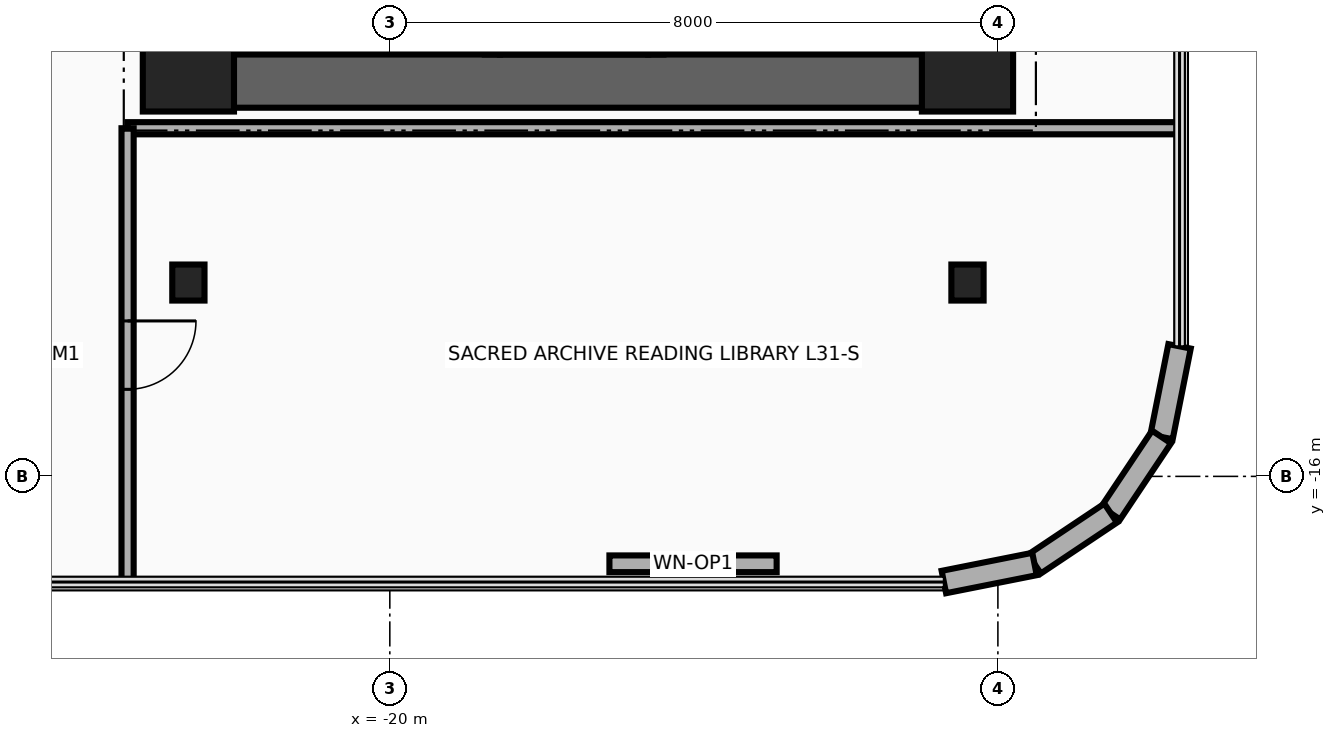
"""IFC4 building model, lengths in metres.
Left out: names, types, materials, properties, quantities, classifications, styles, units other than length and angle.
Written with IfcOpenShell. Run it as: python <this file> out.ifc"""

import sys

from ifc_helpers import new_model, si_unit, direction, frame, frame_2d, origin, origin_2d, place, context, subcontext, project, spatial, rectangle, i_section, extrude, source, transform, mapped, element, fill, save


model = new_model("IFC4")
c1 = context("Model", 3, precision=1e-05, world=origin(), true_north=direction((0.0, 1.0)))
c2 = subcontext(c1, "Body", "Model", "MODEL_VIEW")
j1 = project(units=[si_unit("LENGTHUNIT", "METRE"), si_unit("PLANEANGLEUNIT", "RADIAN")], contexts=[c1])
p1 = place(None, origin())
s1 = spatial("IfcSite", under=j1, at=p1, CompositionType="ELEMENT")
p2 = place(p1, origin())
s2 = spatial("IfcBuilding", under=s1, at=p2, CompositionType="ELEMENT")
p3 = place(p2, frame((0.0, 0.0, 124.2)))
s3 = spatial("IfcBuildingStorey", under=s2, at=p3, CompositionType="ELEMENT", Elevation=124.2)
for number, where, z_axis, x_axis in (
    (1, (-22.16, -10.45, 0.0), (0.0, 0.0, 1.0), (0.0, 1.0, 0.0)),
    (2, (-18.83, -10.45, 0.0), (0.0, 0.0, 1.0), (0.0, 1.0, 0.0)),
):
    element("IfcWall", number, at=place(p3, frame(where, z_axis=z_axis, x_axis=x_axis)), inside=s3, PredefinedType="SHEAR", context=c2, shape_type="SweptSolid", body=[
        extrude(rectangle(XDim=8.67, YDim=0.22, at=frame_2d((4.335, 0.0))), origin(), (0.0, 0.0, 1.0), 3.46),
    ])
p4 = place(p3, frame((-22.65, -11.15, 0.0), z_axis=(0.0, 0.0, 1.0), x_axis=(0.0, 1.0, 0.0)))
e3 = element("IfcWall", 3, at=p4, inside=s3, PredefinedType="SHEAR", context=c2, shape_type="SweptSolid", body=[
    extrude(rectangle(XDim=22.3, YDim=0.7, at=frame_2d((11.15, 0.0))), origin(), (0.0, 0.0, 1.0), 3.46),
])
p5 = place(p3, frame((-22.65, -10.8, 0.0), z_axis=(0.0, 0.0, 1.0), x_axis=(1.0, 0.0, 0.0)))
e4 = element("IfcWall", 4, at=p5, inside=s3, PredefinedType="SHEAR", context=c2, shape_type="SweptSolid", body=[
    extrude(rectangle(XDim=10.25, YDim=0.7, at=frame_2d((5.125, 0.0))), origin(), (0.0, 0.0, 1.0), 3.46),
])
m1 = source(origin(), c2, "Body", "SweptSolid", [
    extrude(rectangle(XDim=1.2, YDim=1.2, at=origin_2d()), origin(), (0.0, 0.0, 1.0), 3.7),
])
for number, where, z_axis, x_axis in (
    (5, (-22.65, -10.6, 0.0), (0.0, 0.0, 1.0), (1.0, 0.0, 0.0)),
    (6, (-12.4, -10.6, 0.0), (0.0, 0.0, 1.0), (1.0, 0.0, 0.0)),
):
    element("IfcColumn", number, at=place(p3, frame(where, z_axis=z_axis, x_axis=x_axis)), inside=s3, PredefinedType="COLUMN", context=c2, shape_type="MappedRepresentation", body=[
        mapped(m1, transform((0.0, 0.0, 0.0), x_axis=(1.0, 0.0, 0.0), y_axis=(0.0, 1.0, 0.0), z_axis=(0.0, 0.0, 1.0), scale=1.0)),
    ])
m2 = source(origin(), c2, "Body", "SweptSolid", [
    extrude(i_section(OverallWidth=0.424, OverallDepth=0.474, WebThickness=0.048, FlangeThickness=0.077, at=origin_2d()), origin(), (0.0, 0.0, 1.0), 3.7),
])
for number, where, z_axis, x_axis in (
    (7, (-22.65, -13.45, 0.0), (0.0, 0.0, 1.0), (1.0, 0.0, 0.0)),
    (8, (-12.4, -13.45, 0.0), (0.0, 0.0, 1.0), (1.0, 0.0, 0.0)),
):
    element("IfcColumn", number, at=place(p3, frame(where, z_axis=z_axis, x_axis=x_axis)), inside=s3, PredefinedType="COLUMN", context=c2, shape_type="MappedRepresentation", body=[
        mapped(m2, transform((0.0, 0.0, 0.0), x_axis=(1.0, 0.0, 0.0), y_axis=(0.0, 1.0, 0.0), z_axis=(0.0, 0.0, 1.0), scale=1.0)),
    ])
p6 = place(p3, frame((-9.61, -14.289, 0.0), z_axis=(0.0, 0.0, 1.0), x_axis=(-0.194996050505, -0.980804027463, 0.0)))
e9 = element("IfcWall", 9, at=p6, inside=s3, PredefinedType="SOLIDWALL", context=c2, shape_type="SweptSolid", body=[
    extrude(rectangle(XDim=1.216, YDim=0.3, at=frame_2d((0.608, 0.0))), origin(), (0.0, 0.0, 1.0), 3.46),
])
for number, where, z_axis, x_axis in (
    (10, (-9.847, -15.482, 0.0), (0.0, 0.0, 1.0), (-0.556, -0.831, 0.0)),
    (11, (-10.517, -16.483, 0.0), (0.0, 0.0, 1.0), (-0.831, -0.556, 0.0)),
):
    element("IfcWall", number, at=place(p3, frame(where, z_axis=z_axis, x_axis=x_axis)), inside=s3, PredefinedType="SOLIDWALL", context=c2, shape_type="SweptSolid", body=[
        extrude(rectangle(XDim=1.205, YDim=0.3, at=frame_2d((0.603, 0.0))), origin(), (0.0, 0.0, 1.0), 3.46),
    ])
p7 = place(p3, frame((-11.518, -17.153, 0.0), z_axis=(0.0, 0.0, 1.0), x_axis=(-0.980804027463, -0.194996050505, 0.0)))
e12 = element("IfcWall", 12, at=p7, inside=s3, PredefinedType="SOLIDWALL", context=c2, shape_type="SweptSolid", body=[
    extrude(rectangle(XDim=1.216, YDim=0.3, at=frame_2d((0.608, 0.0))), origin(), (0.0, 0.0, 1.0), 3.46),
])
p8 = place(p3, frame((-14.911, -17.15, 0.0), z_axis=(0.0, 0.0, 1.0), x_axis=(-1.0, 0.0, 0.0)))
e13 = element("IfcWall", 13, at=p8, inside=s3, PredefinedType="SOLIDWALL", context=c2, shape_type="SweptSolid", body=[
    extrude(rectangle(XDim=2.2, YDim=0.22, at=frame_2d((1.1, 0.0))), origin(), (0.0, 0.0, 1.0), 3.46),
])
p9 = place(p8, frame((0.65, 0.0, 0.95)))
e14 = element("IfcOpeningElement", 14, at=p9, cuts=e13, PredefinedType="OPENING", context=c2, shape_type="SweptSolid", body=[
    extrude(rectangle(XDim=0.9, YDim=1.3, at=frame_2d((0.45, 0.65))), frame((0.0, 0.125, 0.0), z_axis=(0.0, -1.0, 0.0), x_axis=(1.0, 0.0, 0.0)), (0.0, 0.0, 1.0), 0.25),
])
for number, where, z_axis, x_axis in (
    (15, (-18.65, -10.45, 0.0), (0.0, 0.0, 1.0), (0.0, 1.0, 0.0)),
    (16, (-16.5, -10.45, 0.0), (0.0, 0.0, 1.0), (0.0, 1.0, 0.0)),
):
    element("IfcWall", number, at=place(p3, frame(where, z_axis=z_axis, x_axis=x_axis)), inside=s3, PredefinedType="MOVABLE", context=c2, shape_type="SweptSolid", body=[
        extrude(rectangle(XDim=2.35, YDim=0.2, at=frame_2d((1.175, 0.0))), origin(), (0.0, 0.0, 1.0), 2.666),
    ])
p10 = place(p3, frame((-18.55, -10.35, 0.0), z_axis=(0.0, 0.0, 1.0), x_axis=(1.0, 0.0, 0.0)))
e17 = element("IfcWall", 17, at=p10, inside=s3, PredefinedType="MOVABLE", context=c2, shape_type="SweptSolid", body=[
    extrude(rectangle(XDim=1.95, YDim=0.2, at=frame_2d((0.975, 0.0))), origin(), (0.0, 0.0, 1.0), 2.666),
])
p11 = place(p3, frame((-23.45, -11.42, 0.0), z_axis=(0.0, 0.0, 1.0), x_axis=(1.0, 0.0, 0.0)))
e18 = element("IfcWall", 18, at=p11, inside=s3, PredefinedType="PARTITIONING", context=c2, shape_type="SweptSolid", body=[
    extrude(rectangle(XDim=13.84, YDim=0.16, at=frame_2d((6.92, 0.0))), origin(), (0.0, 0.0, 1.0), 2.834),
])
p12 = place(p3, frame((-23.45, -17.39, 0.0), z_axis=(0.0, 0.0, 1.0), x_axis=(0.0, 1.0, 0.0)))
e19 = element("IfcWall", 19, at=p12, inside=s3, PredefinedType="PARTITIONING", context=c2, shape_type="SweptSolid", body=[
    extrude(rectangle(XDim=5.97, YDim=0.16, at=frame_2d((2.985, 0.0))), origin(), (0.0, 0.0, 1.0), 3.46),
])
p13 = place(p12, frame((2.535, 0.0, 0.0)))
e20 = element("IfcOpeningElement", 20, at=p13, cuts=e19, PredefinedType="OPENING", context=c2, shape_type="SweptSolid", body=[
    extrude(rectangle(XDim=0.9, YDim=2.1, at=frame_2d((0.45, 1.05))), frame((0.0, 0.095, 0.0), z_axis=(0.0, -1.0, 0.0), x_axis=(1.0, 0.0, 0.0)), (0.0, 0.0, 1.0), 0.19),
])
p14 = place(p9, origin())
e21 = element("IfcWindow", 21, at=p14, inside=s3, PartitioningType="SINGLE_PANEL", PredefinedType="WINDOW", context=c2, shape_type="SweptSolid", body=[
    extrude(rectangle(XDim=0.9, YDim=1.3, at=frame_2d((0.45, 0.65))), frame((0.0, 0.03, 0.0), z_axis=(0.0, -1.0, 0.0), x_axis=(1.0, 0.0, 0.0)), (0.0, 0.0, 1.0), 0.06),
])
fill(e14, e21)
p15 = place(p13, frame((0.9, 0.0, 0.0), z_axis=(0.0, 0.0, 1.0), x_axis=(-1.0, 0.0, 0.0)))
e22 = element("IfcDoor", 22, at=p15, inside=s3, OperationType="SINGLE_SWING_LEFT", PredefinedType="DOOR", context=c2, shape_type="SweptSolid", body=[
    extrude(rectangle(XDim=0.9, YDim=2.1, at=frame_2d((0.45, 1.05))), frame((0.0, 0.025, 0.0), z_axis=(0.0, -1.0, 0.0), x_axis=(1.0, 0.0, 0.0)), (0.0, 0.0, 1.0), 0.05),
])
fill(e20, e22)
save(model, sys.argv[1])
